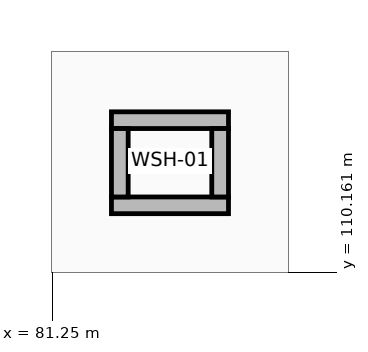
"""IFC4 building model, lengths in metres.
Left out: names, types, materials, properties, quantities, classifications, styles, units other than length and angle.
Written with IfcOpenShell. Run it as: python <this file> out.ifc"""

import sys

from ifc_helpers import new_model, si_unit, direction, frame, frame_2d, origin, place, context, subcontext, project, spatial, rectangle, extrude, element, save


model = new_model("IFC4")
c1 = context("Model", 3, precision=1e-05, world=origin(), true_north=direction((0.0, 1.0)))
c2 = subcontext(c1, "Body", "Model", "MODEL_VIEW")
j1 = project(units=[si_unit("LENGTHUNIT", "METRE"), si_unit("PLANEANGLEUNIT", "RADIAN")], contexts=[c1])
p1 = place(None, origin())
s1 = spatial("IfcSite", under=j1, at=p1, CompositionType="ELEMENT")
p2 = place(p1, origin())
s2 = spatial("IfcBuilding", under=s1, at=p2, CompositionType="ELEMENT")
p3 = place(p2, frame((0.0, 0.0, 13.5)))
s3 = spatial("IfcBuildingStorey", under=s2, at=p3, CompositionType="ELEMENT", Elevation=13.5)
for number, where, z_axis, x_axis in (
    (1, (82.03, 111.04, 0.0), (0.0, 0.0, 1.0), (1.0, 0.0, 0.0)),
    (2, (82.03, 112.16, 0.0), (0.0, 0.0, 1.0), (1.0, 0.0, 0.0)),
):
    element("IfcWall", number, at=place(p3, frame(where, z_axis=z_axis, x_axis=x_axis)), inside=s3, PredefinedType="STANDARD", context=c2, shape_type="SweptSolid", body=[
        extrude(rectangle(XDim=1.54, YDim=0.22, at=frame_2d((0.77, 0.0))), origin(), (0.0, 0.0, 1.0), 3.26),
    ])
for number, where, z_axis, x_axis in (
    (3, (82.14, 111.15, 0.0), (0.0, 0.0, 1.0), (0.0, 1.0, 0.0)),
    (4, (83.46, 111.15, 0.0), (0.0, 0.0, 1.0), (0.0, 1.0, 0.0)),
):
    element("IfcWall", number, at=place(p3, frame(where, z_axis=z_axis, x_axis=x_axis)), inside=s3, PredefinedType="STANDARD", context=c2, shape_type="SweptSolid", body=[
        extrude(rectangle(XDim=0.9, YDim=0.22, at=frame_2d((0.45, 0.0))), origin(), (0.0, 0.0, 1.0), 3.26),
    ])
save(model, sys.argv[1])
